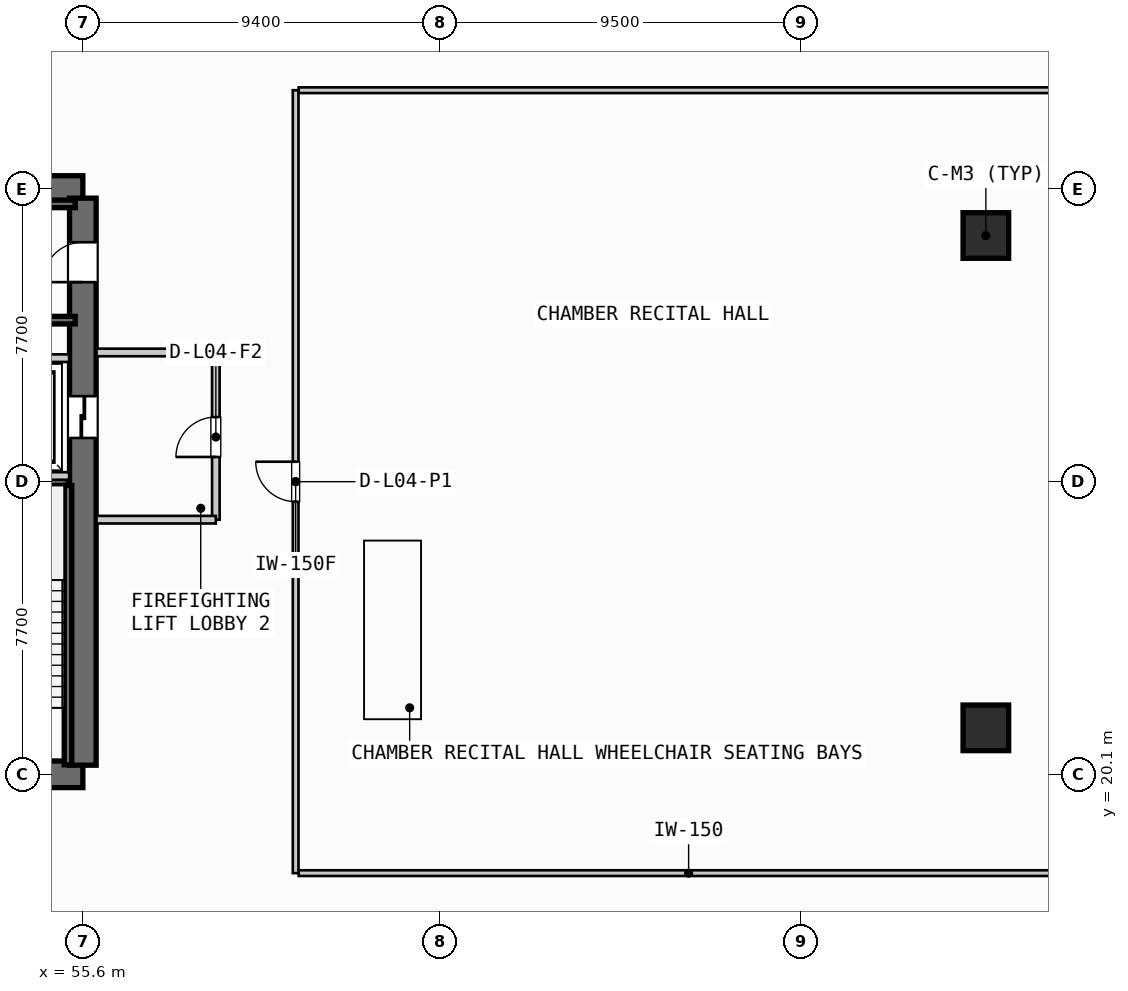
"""IFC4 building model, lengths in metres.
Left out: names, types, materials, properties, quantities, classifications, styles, units other than length and angle.
Written with IfcOpenShell. Run it as: python <this file> out.ifc"""

import sys

from ifc_helpers import new_model, si_unit, direction, frame, frame_2d, origin, origin_2d, place, context, subcontext, project, spatial, rectangle, hollow_rectangle, extrude, source, transform, mapped, element, fill, save


model = new_model("IFC4")
c1 = context("Model", 3, precision=1e-05, world=origin(), true_north=direction((0.0, 1.0)))
c2 = subcontext(c1, "Body", "Model", "MODEL_VIEW")
j1 = project(units=[si_unit("LENGTHUNIT", "METRE"), si_unit("PLANEANGLEUNIT", "RADIAN")], contexts=[c1])
p1 = place(None, origin())
s1 = spatial("IfcSite", under=j1, at=p1, CompositionType="ELEMENT")
p2 = place(p1, origin())
s2 = spatial("IfcBuilding", under=s1, at=p2, CompositionType="ELEMENT")
p3 = place(p2, frame((0.0, 0.0, 19.6)))
s3 = spatial("IfcBuildingStorey", under=s2, at=p3, CompositionType="ELEMENT", Elevation=19.6)
p4 = place(p3, frame((38.0, 20.1, 0.0), z_axis=(0.0, 0.0, 1.0), x_axis=(1.0, 0.0, 0.0)))
e1 = element("IfcWall", 1, at=p4, inside=s3, PredefinedType="SHEAR", context=c2, shape_type="SweptSolid", body=[
    extrude(rectangle(XDim=17.6, YDim=0.7, at=frame_2d((8.8, 0.0))), origin(), (0.0, 0.0, 1.0), 4.08),
])
p5 = place(p4, frame((1.4, 0.0, 0.0)))
e2 = element("IfcOpeningElement", 2, at=p5, cuts=e1, PredefinedType="OPENING", context=c2, shape_type="SweptSolid", body=[
    extrude(rectangle(XDim=1.05, YDim=2.15, at=frame_2d((0.525, 1.075))), frame((0.0, 0.36, 0.0), z_axis=(0.0, -1.0, 0.0), x_axis=(1.0, 0.0, 0.0)), (0.0, 0.0, 1.0), 0.72),
])
p6 = place(p4, frame((15.15, 0.0, 0.0)))
e3 = element("IfcOpeningElement", 3, at=p6, cuts=e1, PredefinedType="OPENING", context=c2, shape_type="SweptSolid", body=[
    extrude(rectangle(XDim=1.05, YDim=2.15, at=frame_2d((0.525, 1.075))), frame((0.0, 0.36, 0.0), z_axis=(0.0, -1.0, 0.0), x_axis=(1.0, 0.0, 0.0)), (0.0, 0.0, 1.0), 0.72),
])
p7 = place(p3, frame((55.6, 35.5, 0.0), z_axis=(0.0, 0.0, 1.0), x_axis=(-1.0, 0.0, 0.0)))
e4 = element("IfcWall", 4, at=p7, inside=s3, PredefinedType="SHEAR", context=c2, shape_type="SweptSolid", body=[
    extrude(rectangle(XDim=17.6, YDim=0.7, at=frame_2d((8.8, 0.0))), origin(), (0.0, 0.0, 1.0), 4.08),
])
p8 = place(p7, frame((8.05, 0.0, 0.0)))
e5 = element("IfcOpeningElement", 5, at=p8, cuts=e4, PredefinedType="OPENING", context=c2, shape_type="SweptSolid", body=[
    extrude(rectangle(XDim=1.5, YDim=2.2, at=frame_2d((0.75, 1.1))), frame((0.0, 0.36, 0.0), z_axis=(0.0, -1.0, 0.0), x_axis=(1.0, 0.0, 0.0)), (0.0, 0.0, 1.0), 0.72),
])
p9 = place(p7, frame((14.95, 0.0, 0.0)))
e6 = element("IfcOpeningElement", 6, at=p9, cuts=e4, PredefinedType="OPENING", context=c2, shape_type="SweptSolid", body=[
    extrude(rectangle(XDim=1.4, YDim=2.3, at=frame_2d((0.7, 1.15))), frame((0.0, 0.36, 0.0), z_axis=(0.0, -1.0, 0.0), x_axis=(1.0, 0.0, 0.0)), (0.0, 0.0, 1.0), 0.72),
])
p10 = place(p7, frame((12.6, 0.0, 0.0)))
e7 = element("IfcOpeningElement", 7, at=p10, cuts=e4, PredefinedType="OPENING", context=c2, shape_type="SweptSolid", body=[
    extrude(rectangle(XDim=0.95, YDim=2.15, at=frame_2d((0.475, 1.075))), frame((0.0, 0.36, 0.0), z_axis=(0.0, -1.0, 0.0), x_axis=(1.0, 0.0, 0.0)), (0.0, 0.0, 1.0), 0.72),
])
p11 = place(p7, frame((10.45, 0.0, 0.0)))
e8 = element("IfcOpeningElement", 8, at=p11, cuts=e4, PredefinedType="OPENING", context=c2, shape_type="SweptSolid", body=[
    extrude(rectangle(XDim=0.95, YDim=2.15, at=frame_2d((0.475, 1.075))), frame((0.0, 0.36, 0.0), z_axis=(0.0, -1.0, 0.0), x_axis=(1.0, 0.0, 0.0)), (0.0, 0.0, 1.0), 0.72),
])
p12 = place(p3, frame((55.6, 20.34, 0.0), z_axis=(0.0, 0.0, 1.0), x_axis=(0.0, 1.0, 0.0)))
e9 = element("IfcWall", 9, at=p12, inside=s3, PredefinedType="SHEAR", context=c2, shape_type="SweptSolid", body=[
    extrude(rectangle(XDim=14.92, YDim=0.7, at=frame_2d((7.46, 0.0))), origin(), (0.0, 0.0, 1.0), 4.08),
])
p13 = place(p12, frame((12.71, 0.0, 0.0)))
e10 = element("IfcOpeningElement", 10, at=p13, cuts=e9, PredefinedType="OPENING", context=c2, shape_type="SweptSolid", body=[
    extrude(rectangle(XDim=1.05, YDim=2.15, at=frame_2d((0.525, 1.075))), frame((0.0, 0.36, 0.0), z_axis=(0.0, -1.0, 0.0), x_axis=(1.0, 0.0, 0.0)), (0.0, 0.0, 1.0), 0.72),
])
p14 = place(p12, frame((8.61, 0.0, 0.0)))
e11 = element("IfcOpeningElement", 11, at=p14, cuts=e9, PredefinedType="OPENING", context=c2, shape_type="SweptSolid", body=[
    extrude(rectangle(XDim=1.1, YDim=2.2, at=frame_2d((0.55, 1.1))), frame((0.0, 0.36, 0.0), z_axis=(0.0, -1.0, 0.0), x_axis=(1.0, 0.0, 0.0)), (0.0, 0.0, 1.0), 0.72),
])
m1 = source(origin(), c2, "Body", "SweptSolid", [
    extrude(hollow_rectangle(XDim=1.2, YDim=1.2, WallThickness=0.045, InnerFilletRadius=0.02, OuterFilletRadius=0.065, at=origin_2d()), origin(), (0.0, 0.0, 1.0), 4.08),
])
for number, where, z_axis, x_axis in (
    (12, (79.362, 34.277, 0.0), (0.0, 0.0, 1.0), (1.0, 0.0, 0.0)),
    (13, (79.362, 21.323, 0.0), (0.0, 0.0, 1.0), (1.0, 0.0, 0.0)),
):
    element("IfcColumn", number, at=place(p3, frame(where, z_axis=z_axis, x_axis=x_axis)), inside=s3, PredefinedType="COLUMN", context=c2, shape_type="MappedRepresentation", body=[
        mapped(m1, transform((0.0, 0.0, 0.0), scale=1.0)),
    ])
p15 = place(p3, frame((52.15, 27.8, 0.0), z_axis=(0.0, 0.0, 1.0), x_axis=(1.0, 0.0, 0.0)))
e14 = element("IfcWall", 14, at=p15, inside=s3, PredefinedType="SHEAR", context=c2, shape_type="SweptSolid", body=[
    extrude(rectangle(XDim=3.06, YDim=0.2, at=frame_2d((1.53, 0.0))), origin(), (0.0, 0.0, 1.0), 4.08),
])
for number, where, z_axis, x_axis in (
    (15, (55.21, 27.7, 0.0), (0.0, 0.0, 1.0), (0.0, -1.0, 0.0)),
    (16, (48.05, 35.11, 0.0), (0.0, 0.0, 1.0), (1.0, 0.0, 0.0)),
    (17, (55.4, 32.05, 0.0), (0.0, 0.0, 1.0), (-1.0, 0.0, 0.0)),
):
    element("IfcWall", number, at=place(p3, frame(where, z_axis=z_axis, x_axis=x_axis)), inside=s3, PredefinedType="SHEAR", context=c2, shape_type="SweptSolid", body=[
        extrude(rectangle(XDim=7.35, YDim=0.2, at=frame_2d((3.675, 0.0))), origin(), (0.0, 0.0, 1.0), 4.08),
    ])
for number, where, z_axis, x_axis in (
    (18, (52.45, 27.95, 0.0), (0.0, 0.0, 1.0), (1.0, 0.0, 0.0)),
    (19, (52.45, 31.05, 0.0), (0.0, 0.0, 1.0), (1.0, 0.0, 0.0)),
):
    element("IfcWall", number, at=place(p3, frame(where, z_axis=z_axis, x_axis=x_axis)), inside=s3, PredefinedType="PARTITIONING", context=c2, shape_type="SweptSolid", body=[
        extrude(rectangle(XDim=2.79, YDim=0.2, at=frame_2d((1.395, 0.0))), origin(), (0.0, 0.0, 1.0), 3.293),
    ])
p16 = place(p3, frame((59.1, 26.8, 0.0), z_axis=(0.0, 0.0, 1.0), x_axis=(0.0, 1.0, 0.0)))
e20 = element("IfcWall", 20, at=p16, inside=s3, PredefinedType="PARTITIONING", context=c2, shape_type="SweptSolid", body=[
    extrude(rectangle(XDim=4.4, YDim=0.2, at=frame_2d((2.2, 0.0))), origin(), (0.0, 0.0, 1.0), 3.293),
])
p17 = place(p16, frame((1.65, 0.0, 0.0)))
e21 = element("IfcOpeningElement", 21, at=p17, cuts=e20, PredefinedType="OPENING", context=c2, shape_type="SweptSolid", body=[
    extrude(rectangle(XDim=1.05, YDim=2.15, at=frame_2d((0.525, 1.075))), frame((0.0, 0.11, 0.0), z_axis=(0.0, -1.0, 0.0), x_axis=(1.0, 0.0, 0.0)), (0.0, 0.0, 1.0), 0.22),
])
for number, where, z_axis, x_axis in (
    (22, (55.96, 26.8, 0.0), (0.0, 0.0, 1.0), (1.0, 0.0, 0.0)),
    (23, (55.96, 31.2, 0.0), (0.0, 0.0, 1.0), (1.0, 0.0, 0.0)),
):
    element("IfcWall", number, at=place(p3, frame(where, z_axis=z_axis, x_axis=x_axis)), inside=s3, PredefinedType="PARTITIONING", context=c2, shape_type="SweptSolid", body=[
        extrude(rectangle(XDim=3.14, YDim=0.2, at=frame_2d((1.57, 0.0))), origin(), (0.0, 0.0, 1.0), 3.293),
    ])
p18 = place(p3, frame((61.2, 17.5, 0.0), z_axis=(0.0, 0.0, 1.0), x_axis=(0.0, 1.0, 0.0)))
e24 = element("IfcWall", 24, at=p18, inside=s3, PredefinedType="PARTITIONING", context=c2, shape_type="SweptSolid", body=[
    extrude(rectangle(XDim=20.6, YDim=0.15, at=frame_2d((10.3, 0.0))), origin(), (0.0, 0.0, 1.0), 3.293),
])
p19 = place(p18, frame((9.775, 0.0, 0.0)))
e25 = element("IfcOpeningElement", 25, at=p19, cuts=e24, PredefinedType="OPENING", context=c2, shape_type="SweptSolid", body=[
    extrude(rectangle(XDim=1.05, YDim=2.15, at=frame_2d((0.525, 1.075))), frame((0.0, 0.085, 0.0), z_axis=(0.0, -1.0, 0.0), x_axis=(1.0, 0.0, 0.0)), (0.0, 0.0, 1.0), 0.17),
])
for number, where, z_axis, x_axis in (
    (26, (61.28, 17.5, 0.0), (0.0, 0.0, 1.0), (1.0, 0.0, 0.0)),
    (27, (61.28, 38.1, 0.0), (0.0, 0.0, 1.0), (1.0, 0.0, 0.0)),
):
    element("IfcWall", number, at=place(p3, frame(where, z_axis=z_axis, x_axis=x_axis)), inside=s3, PredefinedType="PARTITIONING", context=c2, shape_type="SweptSolid", body=[
        extrude(rectangle(XDim=20.521, YDim=0.15, at=frame_2d((10.261, 0.0))), origin(), (0.0, 0.0, 1.0), 3.293),
    ])
m2 = source(origin(), c2, "Body", "SweptSolid", [
    extrude(rectangle(XDim=1.05, YDim=2.15, at=frame_2d((0.525, 1.075))), frame((0.0, 0.025, 0.0), z_axis=(0.0, -1.0, 0.0), x_axis=(1.0, 0.0, 0.0)), (0.0, 0.0, 1.0), 0.05),
])
p20 = place(p13, origin())
e28 = element("IfcDoor", 28, at=p20, inside=s3, OperationType="SINGLE_SWING_LEFT", PredefinedType="DOOR", context=c2, shape_type="MappedRepresentation", body=[
    mapped(m2, transform((0.0, 0.0, 0.0), scale=1.0)),
])
fill(e10, e28)
m3 = source(origin(), c2, "Body", "SweptSolid", [
    extrude(rectangle(XDim=1.1, YDim=2.2, at=frame_2d((0.55, 1.1))), frame((0.0, 0.025, 0.0), z_axis=(0.0, -1.0, 0.0), x_axis=(1.0, 0.0, 0.0)), (0.0, 0.0, 1.0), 0.05),
])
p21 = place(p14, origin())
e29 = element("IfcDoor", 29, at=p21, inside=s3, OperationType="SLIDING_TO_RIGHT", PredefinedType="DOOR", context=c2, shape_type="MappedRepresentation", body=[
    mapped(m3, transform((0.0, 0.0, 0.0), scale=1.0)),
])
fill(e11, e29)
p22 = place(p17, origin())
e30 = element("IfcDoor", 30, at=p22, inside=s3, OperationType="SINGLE_SWING_LEFT", PredefinedType="DOOR", context=c2, shape_type="MappedRepresentation", body=[
    mapped(m2, transform((0.0, 0.0, 0.0), scale=1.0)),
])
fill(e21, e30)
p23 = place(p19, origin())
e31 = element("IfcDoor", 31, at=p23, inside=s3, OperationType="SINGLE_SWING_RIGHT", PredefinedType="DOOR", context=c2, shape_type="MappedRepresentation", body=[
    mapped(m2, transform((0.0, 0.0, 0.0), scale=1.0)),
])
fill(e25, e31)
save(model, sys.argv[1])
